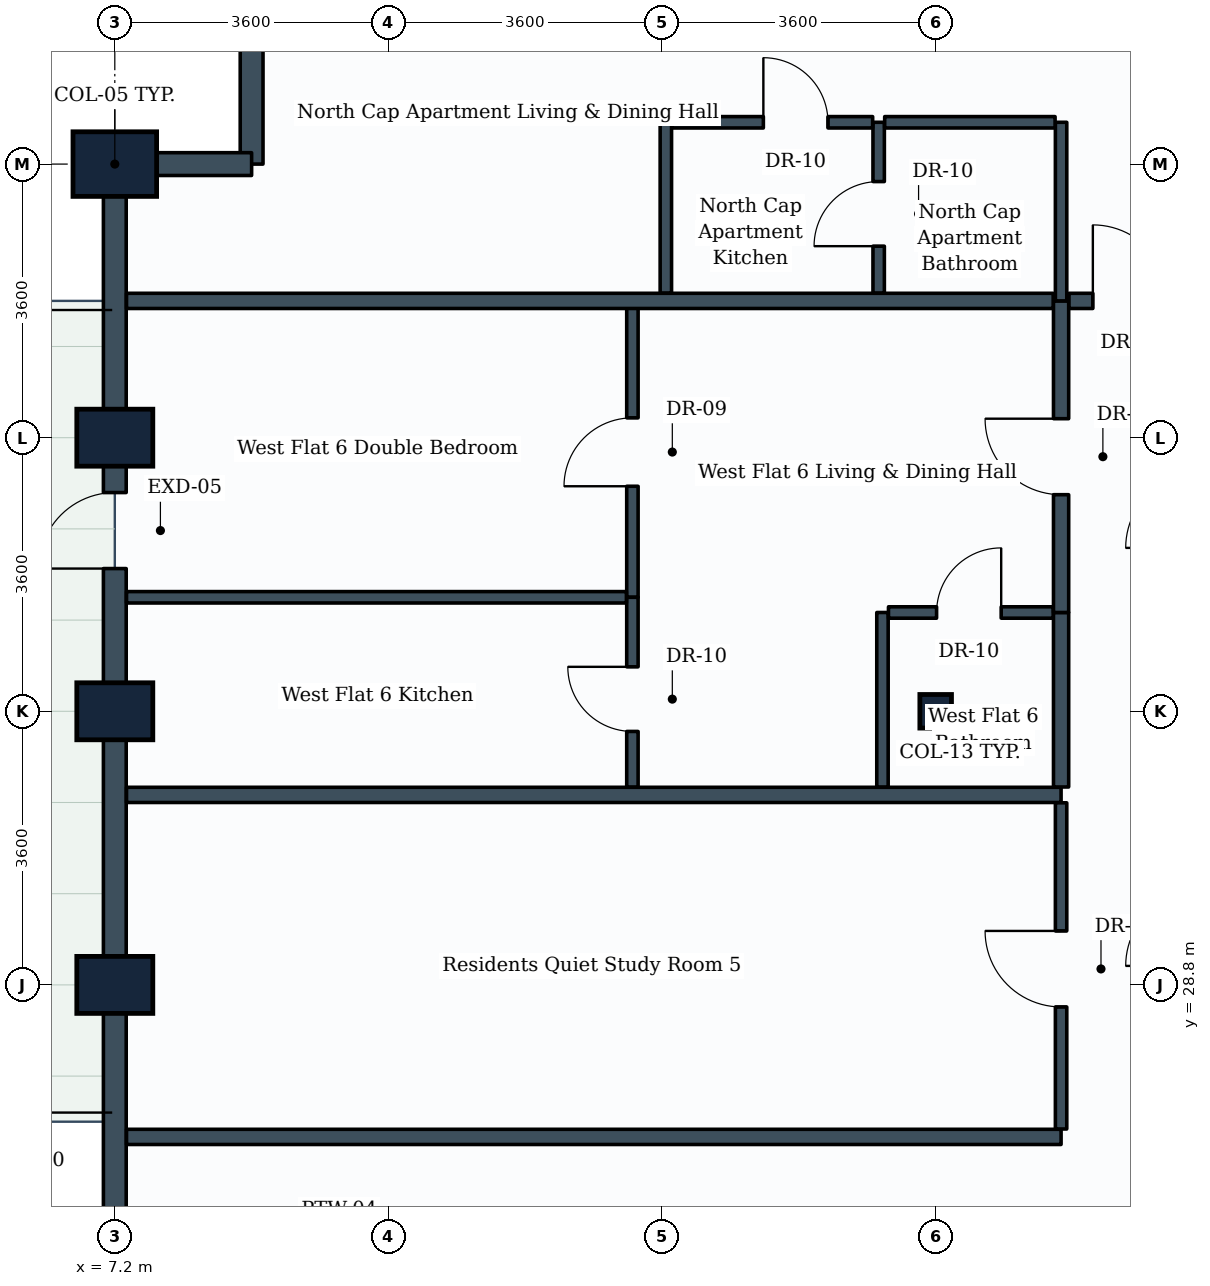
"""IFC4 building model, lengths in metres.
Left out: names, types, materials, properties, quantities, classifications, styles, units other than length and angle.
Written with IfcOpenShell. Run it as: python <this file> out.ifc"""

import sys

from ifc_helpers import new_model, si_unit, direction, frame, frame_2d, origin, origin_2d, place, context, subcontext, project, spatial, rectangle, i_section, extrude, element, fill, save


model = new_model("IFC4")
c1 = context("Model", 3, precision=1e-05, world=origin(), true_north=direction((0.0, 1.0)))
c2 = subcontext(c1, "Body", "Model", "MODEL_VIEW")
j1 = project(units=[si_unit("LENGTHUNIT", "METRE"), si_unit("PLANEANGLEUNIT", "RADIAN")], contexts=[c1])
p1 = place(None, origin())
s1 = spatial("IfcSite", under=j1, at=p1, CompositionType="ELEMENT")
p2 = place(p1, origin())
s2 = spatial("IfcBuilding", under=s1, at=p2, CompositionType="ELEMENT")
p3 = place(p2, frame((0.0, 0.0, 150.4)))
s3 = spatial("IfcBuildingStorey", under=s2, at=p3, CompositionType="ELEMENT", Elevation=150.4)
for number, where, z_axis, x_axis in (
    (1, (7.2, 28.8, 0.0), (0.0, 0.0, 1.0), (0.0, 1.0, 0.0)),
    (2, (7.2, 32.4, 0.0), (0.0, 0.0, 1.0), (0.0, 1.0, 0.0)),
    (3, (7.2, 36.0, 0.0), (0.0, 0.0, 1.0), (0.0, 1.0, 0.0)),
):
    element("IfcColumn", number, at=place(p3, frame(where, z_axis=z_axis, x_axis=x_axis)), inside=s3, PredefinedType="COLUMN", context=c2, shape_type="SweptSolid", body=[
        extrude(rectangle(XDim=0.75, YDim=1.0, at=origin_2d()), origin(), (0.0, 0.0, 1.0), 3.8),
    ])
p4 = place(p3, frame((7.2, 39.6, 0.0), z_axis=(0.0, 0.0, 1.0), x_axis=(0.0, 1.0, 0.0)))
e4 = element("IfcColumn", 4, at=p4, inside=s3, PredefinedType="COLUMN", context=c2, shape_type="SweptSolid", body=[
    extrude(rectangle(XDim=0.85, YDim=1.1, at=origin_2d()), origin(), (0.0, 0.0, 1.0), 3.8),
])
p5 = place(p3, frame((18.0, 32.4, 0.0), z_axis=(0.0, 0.0, 1.0), x_axis=(1.0, 0.0, 0.0)))
e5 = element("IfcColumn", 5, at=p5, inside=s3, PredefinedType="COLUMN", context=c2, shape_type="SweptSolid", body=[
    extrude(i_section(OverallWidth=0.416, OverallDepth=0.442, WebThickness=0.025, FlangeThickness=0.041, FilletRadius=0.015, at=origin_2d()), origin(), (0.0, 0.0, 1.0), 3.8),
])
p6 = place(p3, frame((9.0, 39.6, 0.0), z_axis=(0.0, 0.0, 1.0), x_axis=(0.0, 1.0, 0.0)))
e6 = element("IfcWall", 6, at=p6, inside=s3, PredefinedType="STANDARD", context=c2, shape_type="SweptSolid", body=[
    extrude(rectangle(XDim=1.8, YDim=0.3, at=frame_2d((0.9, 0.0))), origin(), (0.0, 0.0, 1.0), 3.535),
])
p7 = place(p3, frame((7.2, 39.6, 0.0), z_axis=(0.0, 0.0, 1.0), x_axis=(1.0, 0.0, 0.0)))
e7 = element("IfcWall", 7, at=p7, inside=s3, PredefinedType="STANDARD", context=c2, shape_type="SweptSolid", body=[
    extrude(rectangle(XDim=1.8, YDim=0.3, at=frame_2d((0.9, 0.0))), origin(), (0.0, 0.0, 1.0), 2.93),
])
p8 = place(p3, frame((7.2, 36.0, 0.0), z_axis=(0.0, 0.0, 1.0), x_axis=(0.0, 1.0, 0.0)))
e8 = element("IfcWall", 8, at=p8, inside=s3, PredefinedType="STANDARD", context=c2, shape_type="SweptSolid", body=[
    extrude(rectangle(XDim=3.6, YDim=0.3, at=frame_2d((1.8, 0.0))), origin(), (0.0, 0.0, 1.0), 2.93),
])
p9 = place(p3, frame((7.2, 32.4, 0.0), z_axis=(0.0, 0.0, 1.0), x_axis=(0.0, 1.0, 0.0)))
e9 = element("IfcWall", 9, at=p9, inside=s3, PredefinedType="STANDARD", context=c2, shape_type="SweptSolid", body=[
    extrude(rectangle(XDim=3.6, YDim=0.3, at=frame_2d((1.8, 0.0))), origin(), (0.0, 0.0, 1.0), 2.93),
])
p10 = place(p9, frame((1.878, 0.0, 0.0)))
e10 = element("IfcOpeningElement", 10, at=p10, cuts=e9, PredefinedType="OPENING", context=c2, shape_type="SweptSolid", body=[
    extrude(rectangle(XDim=1.0, YDim=2.1, at=frame_2d((0.5, 1.05))), frame((0.0, 0.16, 0.0), z_axis=(0.0, -1.0, 0.0), x_axis=(1.0, 0.0, 0.0)), (0.0, 0.0, 1.0), 0.32),
])
p11 = place(p3, frame((7.2, 28.8, 0.0), z_axis=(0.0, 0.0, 1.0), x_axis=(0.0, 1.0, 0.0)))
e11 = element("IfcWall", 11, at=p11, inside=s3, PredefinedType="STANDARD", context=c2, shape_type="SweptSolid", body=[
    extrude(rectangle(XDim=3.6, YDim=0.3, at=frame_2d((1.8, 0.0))), origin(), (0.0, 0.0, 1.0), 2.93),
])
p12 = place(p3, frame((7.2, 25.2, 0.0), z_axis=(0.0, 0.0, 1.0), x_axis=(0.0, 1.0, 0.0)))
e12 = element("IfcWall", 12, at=p12, inside=s3, PredefinedType="STANDARD", context=c2, shape_type="SweptSolid", body=[
    extrude(rectangle(XDim=3.6, YDim=0.3, at=frame_2d((1.8, 0.0))), origin(), (0.0, 0.0, 1.0), 2.93),
])
for number, where, z_axis, x_axis in (
    (13, (7.354, 26.8, 0.0), (0.0, 0.0, 1.0), (1.0, 0.0, 0.0)),
    (14, (7.354, 31.3, 0.0), (0.0, 0.0, 1.0), (1.0, 0.0, 0.0)),
):
    element("IfcWall", number, at=place(p3, frame(where, z_axis=z_axis, x_axis=x_axis)), inside=s3, PredefinedType="PARTITIONING", context=c2, shape_type="SweptSolid", body=[
        extrude(rectangle(XDim=12.296, YDim=0.2, at=frame_2d((6.148, 0.0))), origin(), (0.0, 0.0, 1.0), 2.93),
    ])
p13 = place(p3, frame((19.65, 26.904, 0.0), z_axis=(0.0, 0.0, 1.0), x_axis=(0.0, 1.0, 0.0)))
e15 = element("IfcWall", 15, at=p13, inside=s3, PredefinedType="PARTITIONING", context=c2, shape_type="SweptSolid", body=[
    extrude(rectangle(XDim=4.292, YDim=0.15, at=frame_2d((2.146, 0.0))), origin(), (0.0, 0.0, 1.0), 3.17),
])
p14 = place(p13, frame((1.606, 0.0, 0.0)))
e16 = element("IfcOpeningElement", 16, at=p14, cuts=e15, PredefinedType="OPENING", context=c2, shape_type="SweptSolid", body=[
    extrude(rectangle(XDim=1.0, YDim=2.1, at=frame_2d((0.5, 1.05))), frame((0.0, 0.085, 0.0), z_axis=(0.0, -1.0, 0.0), x_axis=(1.0, 0.0, 0.0)), (0.0, 0.0, 1.0), 0.17),
])
p15 = place(p3, frame((19.65, 31.404, 0.0), z_axis=(0.0, 0.0, 1.0), x_axis=(0.0, 1.0, 0.0)))
e17 = element("IfcWall", 17, at=p15, inside=s3, PredefinedType="PARTITIONING", context=c2, shape_type="SweptSolid", body=[
    extrude(rectangle(XDim=2.296, YDim=0.2, at=frame_2d((1.148, 0.0))), origin(), (0.0, 0.0, 1.0), 3.18),
])
p16 = place(p3, frame((17.3, 31.404, 0.0), z_axis=(0.0, 0.0, 1.0), x_axis=(0.0, 1.0, 0.0)))
e18 = element("IfcWall", 18, at=p16, inside=s3, PredefinedType="PARTITIONING", context=c2, shape_type="SweptSolid", body=[
    extrude(rectangle(XDim=2.296, YDim=0.15, at=frame_2d((1.148, 0.0))), origin(), (0.0, 0.0, 1.0), 3.18),
])
p17 = place(p3, frame((17.379, 33.7, 0.0), z_axis=(0.0, 0.0, 1.0), x_axis=(1.0, 0.0, 0.0)))
e19 = element("IfcWall", 19, at=p17, inside=s3, PredefinedType="PARTITIONING", context=c2, shape_type="SweptSolid", body=[
    extrude(rectangle(XDim=2.167, YDim=0.15, at=frame_2d((1.083, 0.0))), origin(), (0.0, 0.0, 1.0), 3.17),
])
p18 = place(p17, frame((0.633, 0.0, 0.0)))
e20 = element("IfcOpeningElement", 20, at=p18, cuts=e19, PredefinedType="OPENING", context=c2, shape_type="SweptSolid", body=[
    extrude(rectangle(XDim=0.85, YDim=2.1, at=frame_2d((0.425, 1.05))), frame((0.0, 0.085, 0.0), z_axis=(0.0, -1.0, 0.0), x_axis=(1.0, 0.0, 0.0)), (0.0, 0.0, 1.0), 0.17),
])
p19 = place(p3, frame((19.65, 33.7, 0.0), z_axis=(0.0, 0.0, 1.0), x_axis=(0.0, 1.0, 0.0)))
e21 = element("IfcWall", 21, at=p19, inside=s3, PredefinedType="PARTITIONING", context=c2, shape_type="SweptSolid", body=[
    extrude(rectangle(XDim=4.1, YDim=0.2, at=frame_2d((2.05, 0.0))), origin(), (0.0, 0.0, 1.0), 3.17),
])
p20 = place(p19, frame((1.55, 0.0, 0.0)))
e22 = element("IfcOpeningElement", 22, at=p20, cuts=e21, PredefinedType="OPENING", context=c2, shape_type="SweptSolid", body=[
    extrude(rectangle(XDim=1.0, YDim=2.1, at=frame_2d((0.5, 1.05))), frame((0.0, 0.11, 0.0), z_axis=(0.0, -1.0, 0.0), x_axis=(1.0, 0.0, 0.0)), (0.0, 0.0, 1.0), 0.22),
])
p21 = place(p3, frame((14.01, 33.9, 0.0), z_axis=(0.0, 0.0, 1.0), x_axis=(0.0, 1.0, 0.0)))
e23 = element("IfcWall", 23, at=p21, inside=s3, PredefinedType="PARTITIONING", context=c2, shape_type="SweptSolid", body=[
    extrude(rectangle(XDim=3.9, YDim=0.15, at=frame_2d((1.95, 0.0))), origin(), (0.0, 0.0, 1.0), 3.17),
])
p22 = place(p21, frame((1.461, 0.0, 0.0)))
e24 = element("IfcOpeningElement", 24, at=p22, cuts=e23, PredefinedType="OPENING", context=c2, shape_type="SweptSolid", body=[
    extrude(rectangle(XDim=0.9, YDim=2.1, at=frame_2d((0.45, 1.05))), frame((0.0, 0.085, 0.0), z_axis=(0.0, -1.0, 0.0), x_axis=(1.0, 0.0, 0.0)), (0.0, 0.0, 1.0), 0.17),
])
p23 = place(p3, frame((14.01, 31.404, 0.0), z_axis=(0.0, 0.0, 1.0), x_axis=(0.0, 1.0, 0.0)))
e25 = element("IfcWall", 25, at=p23, inside=s3, PredefinedType="PARTITIONING", context=c2, shape_type="SweptSolid", body=[
    extrude(rectangle(XDim=2.496, YDim=0.15, at=frame_2d((1.248, 0.0))), origin(), (0.0, 0.0, 1.0), 3.18),
])
p24 = place(p23, frame((0.731, 0.0, 0.0)))
e26 = element("IfcOpeningElement", 26, at=p24, cuts=e25, PredefinedType="OPENING", context=c2, shape_type="SweptSolid", body=[
    extrude(rectangle(XDim=0.85, YDim=2.1, at=frame_2d((0.425, 1.05))), frame((0.0, 0.085, 0.0), z_axis=(0.0, -1.0, 0.0), x_axis=(1.0, 0.0, 0.0)), (0.0, 0.0, 1.0), 0.17),
])
p25 = place(p3, frame((7.354, 33.9, 0.0), z_axis=(0.0, 0.0, 1.0), x_axis=(1.0, 0.0, 0.0)))
e27 = element("IfcWall", 27, at=p25, inside=s3, PredefinedType="PARTITIONING", context=c2, shape_type="SweptSolid", body=[
    extrude(rectangle(XDim=6.577, YDim=0.15, at=frame_2d((3.289, 0.0))), origin(), (0.0, 0.0, 1.0), 2.93),
])
p26 = place(p3, frame((7.354, 37.8, 0.0), z_axis=(0.0, 0.0, 1.0), x_axis=(1.0, 0.0, 0.0)))
e28 = element("IfcWall", 28, at=p26, inside=s3, PredefinedType="PARTITIONING", context=c2, shape_type="SweptSolid", body=[
    extrude(rectangle(XDim=12.192, YDim=0.2, at=frame_2d((6.096, 0.0))), origin(), (0.0, 0.0, 1.0), 2.93),
])
p27 = place(p3, frame((19.754, 37.8, 0.0), z_axis=(0.0, 0.0, 1.0), x_axis=(1.0, 0.0, 0.0)))
e29 = element("IfcWall", 29, at=p27, inside=s3, PredefinedType="PARTITIONING", context=c2, shape_type="SweptSolid", body=[
    extrude(rectangle(XDim=1.667, YDim=0.2, at=frame_2d((0.833, 0.0))), origin(), (0.0, 0.0, 1.0), 3.535),
])
p28 = place(p27, frame((0.314, 0.0, 0.0)))
e30 = element("IfcOpeningElement", 30, at=p28, cuts=e29, PredefinedType="OPENING", context=c2, shape_type="SweptSolid", body=[
    extrude(rectangle(XDim=1.0, YDim=2.1, at=frame_2d((0.5, 1.05))), frame((0.0, 0.11, 0.0), z_axis=(0.0, -1.0, 0.0), x_axis=(1.0, 0.0, 0.0)), (0.0, 0.0, 1.0), 0.22),
])
p29 = place(p3, frame((19.65, 37.8, 0.0), z_axis=(0.0, 0.0, 1.0), x_axis=(0.0, 1.0, 0.0)))
e31 = element("IfcWall", 31, at=p29, inside=s3, PredefinedType="PARTITIONING", context=c2, shape_type="SweptSolid", body=[
    extrude(rectangle(XDim=2.35, YDim=0.15, at=frame_2d((1.175, 0.0))), origin(), (0.0, 0.0, 1.0), 3.535),
])
p30 = place(p3, frame((17.25, 37.904, 0.0), z_axis=(0.0, 0.0, 1.0), x_axis=(0.0, 1.0, 0.0)))
e32 = element("IfcWall", 32, at=p30, inside=s3, PredefinedType="PARTITIONING", context=c2, shape_type="SweptSolid", body=[
    extrude(rectangle(XDim=2.246, YDim=0.15, at=frame_2d((1.123, 0.0))), origin(), (0.0, 0.0, 1.0), 3.535),
])
p31 = place(p30, frame((0.616, 0.0, 0.0)))
e33 = element("IfcOpeningElement", 33, at=p31, cuts=e32, PredefinedType="OPENING", context=c2, shape_type="SweptSolid", body=[
    extrude(rectangle(XDim=0.85, YDim=2.1, at=frame_2d((0.425, 1.05))), frame((0.0, 0.085, 0.0), z_axis=(0.0, -1.0, 0.0), x_axis=(1.0, 0.0, 0.0)), (0.0, 0.0, 1.0), 0.17),
])
p32 = place(p3, frame((17.329, 40.15, 0.0), z_axis=(0.0, 0.0, 1.0), x_axis=(1.0, 0.0, 0.0)))
e34 = element("IfcWall", 34, at=p32, inside=s3, PredefinedType="PARTITIONING", context=c2, shape_type="SweptSolid", body=[
    extrude(rectangle(XDim=2.242, YDim=0.15, at=frame_2d((1.121, 0.0))), origin(), (0.0, 0.0, 1.0), 3.17),
])
p33 = place(p3, frame((14.45, 37.904, 0.0), z_axis=(0.0, 0.0, 1.0), x_axis=(0.0, 1.0, 0.0)))
e35 = element("IfcWall", 35, at=p33, inside=s3, PredefinedType="PARTITIONING", context=c2, shape_type="SweptSolid", body=[
    extrude(rectangle(XDim=2.246, YDim=0.15, at=frame_2d((1.123, 0.0))), origin(), (0.0, 0.0, 1.0), 3.535),
])
p34 = place(p3, frame((14.529, 40.15, 0.0), z_axis=(0.0, 0.0, 1.0), x_axis=(1.0, 0.0, 0.0)))
e36 = element("IfcWall", 36, at=p34, inside=s3, PredefinedType="PARTITIONING", context=c2, shape_type="SweptSolid", body=[
    extrude(rectangle(XDim=2.642, YDim=0.15, at=frame_2d((1.321, 0.0))), origin(), (0.0, 0.0, 1.0), 3.535),
])
p35 = place(p34, frame((1.204, 0.0, 0.0)))
e37 = element("IfcOpeningElement", 37, at=p35, cuts=e36, PredefinedType="OPENING", context=c2, shape_type="SweptSolid", body=[
    extrude(rectangle(XDim=0.85, YDim=2.1, at=frame_2d((0.425, 1.05))), frame((0.0, 0.085, 0.0), z_axis=(0.0, -1.0, 0.0), x_axis=(1.0, 0.0, 0.0)), (0.0, 0.0, 1.0), 0.17),
])
p36 = place(p10, origin())
e38 = element("IfcDoor", 38, at=p36, inside=s3, OperationType="SINGLE_SWING_LEFT", PredefinedType="DOOR", context=c2, shape_type="SweptSolid", body=[
    extrude(rectangle(XDim=1.0, YDim=2.1, at=frame_2d((0.5, 1.05))), frame((0.0, 0.025, 0.0), z_axis=(0.0, -1.0, 0.0), x_axis=(1.0, 0.0, 0.0)), (0.0, 0.0, 1.0), 0.05),
])
fill(e10, e38)
p37 = place(p14, origin())
e39 = element("IfcDoor", 39, at=p37, inside=s3, OperationType="SINGLE_SWING_RIGHT", PredefinedType="DOOR", context=c2, shape_type="SweptSolid", body=[
    extrude(rectangle(XDim=1.0, YDim=2.1, at=frame_2d((0.5, 1.05))), frame((0.0, 0.025, 0.0), z_axis=(0.0, -1.0, 0.0), x_axis=(1.0, 0.0, 0.0)), (0.0, 0.0, 1.0), 0.05),
])
fill(e16, e39)
p38 = place(p18, origin())
e40 = element("IfcDoor", 40, at=p38, inside=s3, OperationType="SINGLE_SWING_RIGHT", PredefinedType="DOOR", context=c2, shape_type="SweptSolid", body=[
    extrude(rectangle(XDim=0.85, YDim=2.1, at=frame_2d((0.425, 1.05))), frame((0.0, 0.025, 0.0), z_axis=(0.0, -1.0, 0.0), x_axis=(1.0, 0.0, 0.0)), (0.0, 0.0, 1.0), 0.05),
])
fill(e20, e40)
p39 = place(p20, origin())
e41 = element("IfcDoor", 41, at=p39, inside=s3, OperationType="SINGLE_SWING_RIGHT", PredefinedType="DOOR", context=c2, shape_type="SweptSolid", body=[
    extrude(rectangle(XDim=1.0, YDim=2.1, at=frame_2d((0.5, 1.05))), frame((0.0, 0.025, 0.0), z_axis=(0.0, -1.0, 0.0), x_axis=(1.0, 0.0, 0.0)), (0.0, 0.0, 1.0), 0.05),
])
fill(e22, e41)
p40 = place(p22, origin())
e42 = element("IfcDoor", 42, at=p40, inside=s3, OperationType="SINGLE_SWING_LEFT", PredefinedType="DOOR", context=c2, shape_type="SweptSolid", body=[
    extrude(rectangle(XDim=0.9, YDim=2.1, at=frame_2d((0.45, 1.05))), frame((0.0, 0.025, 0.0), z_axis=(0.0, -1.0, 0.0), x_axis=(1.0, 0.0, 0.0)), (0.0, 0.0, 1.0), 0.05),
])
fill(e24, e42)
p41 = place(p24, origin())
e43 = element("IfcDoor", 43, at=p41, inside=s3, OperationType="SINGLE_SWING_RIGHT", PredefinedType="DOOR", context=c2, shape_type="SweptSolid", body=[
    extrude(rectangle(XDim=0.85, YDim=2.1, at=frame_2d((0.425, 1.05))), frame((0.0, 0.025, 0.0), z_axis=(0.0, -1.0, 0.0), x_axis=(1.0, 0.0, 0.0)), (0.0, 0.0, 1.0), 0.05),
])
fill(e26, e43)
p42 = place(p28, origin())
e44 = element("IfcDoor", 44, at=p42, inside=s3, OperationType="SINGLE_SWING_LEFT", PredefinedType="DOOR", context=c2, shape_type="SweptSolid", body=[
    extrude(rectangle(XDim=1.0, YDim=2.1, at=frame_2d((0.5, 1.05))), frame((0.0, 0.025, 0.0), z_axis=(0.0, -1.0, 0.0), x_axis=(1.0, 0.0, 0.0)), (0.0, 0.0, 1.0), 0.05),
])
fill(e30, e44)
p43 = place(p31, origin())
e45 = element("IfcDoor", 45, at=p43, inside=s3, OperationType="SINGLE_SWING_LEFT", PredefinedType="DOOR", context=c2, shape_type="SweptSolid", body=[
    extrude(rectangle(XDim=0.85, YDim=2.1, at=frame_2d((0.425, 1.05))), frame((0.0, 0.025, 0.0), z_axis=(0.0, -1.0, 0.0), x_axis=(1.0, 0.0, 0.0)), (0.0, 0.0, 1.0), 0.05),
])
fill(e33, e45)
p44 = place(p35, origin())
e46 = element("IfcDoor", 46, at=p44, inside=s3, OperationType="SINGLE_SWING_LEFT", PredefinedType="DOOR", context=c2, shape_type="SweptSolid", body=[
    extrude(rectangle(XDim=0.85, YDim=2.1, at=frame_2d((0.425, 1.05))), frame((0.0, 0.025, 0.0), z_axis=(0.0, -1.0, 0.0), x_axis=(1.0, 0.0, 0.0)), (0.0, 0.0, 1.0), 0.05),
])
fill(e37, e46)
save(model, sys.argv[1])
